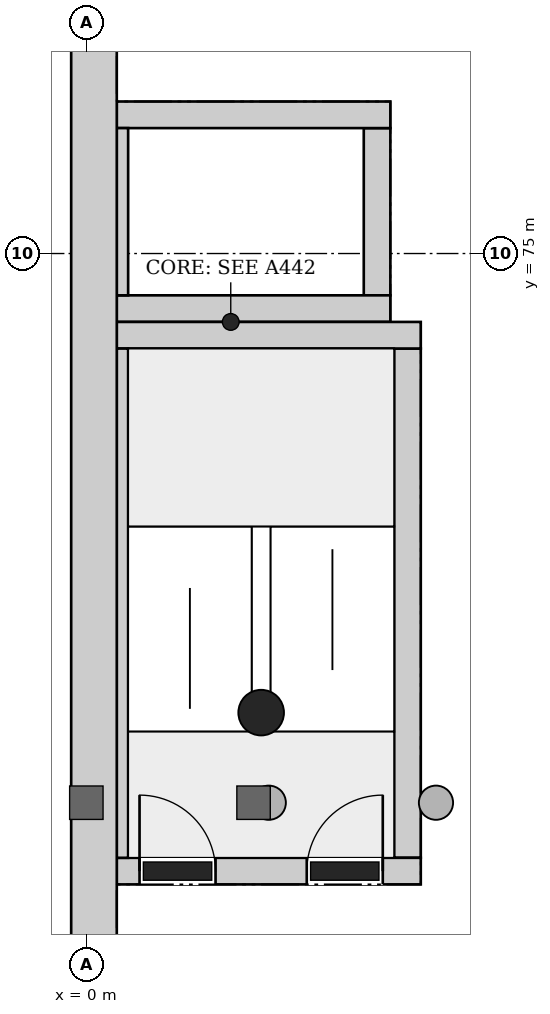
"""IFC4 building model, lengths in metres.
Left out: names, types, materials, properties, quantities, classifications, styles, units other than length and angle.
Written with IfcOpenShell. Run it as: python <this file> out.ifc"""

import sys

from ifc_helpers import new_model, si_unit, direction, frame, frame_2d, origin, place, context, subcontext, project, spatial, rectangle, extrude, element, fill, save


model = new_model("IFC4")
c1 = context("Model", 3, precision=1e-05, world=origin(), true_north=direction((0.0, 1.0)))
c2 = subcontext(c1, "Body", "Model", "MODEL_VIEW")
j1 = project(units=[si_unit("LENGTHUNIT", "METRE"), si_unit("PLANEANGLEUNIT", "RADIAN")], contexts=[c1])
p1 = place(None, origin())
s1 = spatial("IfcSite", under=j1, at=p1, CompositionType="ELEMENT")
p2 = place(p1, origin())
s2 = spatial("IfcBuilding", under=s1, at=p2, CompositionType="ELEMENT")
p3 = place(p2, frame((0.0, 0.0, -5.5)))
s3 = spatial("IfcBuildingStorey", under=s2, at=p3, CompositionType="ELEMENT", Elevation=-5.5)
p4 = place(p3, frame((0.101, 46.72, 0.0), z_axis=(0.0, 0.0, 1.0), x_axis=(0.0, 1.0, 0.0)))
e1 = element("IfcWall", 1, at=p4, inside=s3, PredefinedType="SOLIDWALL", context=c2, shape_type="SweptSolid", body=[
    extrude(rectangle(XDim=47.36, YDim=0.6, at=frame_2d((23.68, 0.0))), origin(), (0.0, 0.0, 1.0), 5.5),
])
p5 = place(p3, frame((0.4, 66.875, 0.0), z_axis=(0.0, 0.0, 1.0), x_axis=(1.0, 0.0, 0.0)))
e2 = element("IfcWall", 2, at=p5, inside=s3, PredefinedType="SHEAR", context=c2, shape_type="SweptSolid", body=[
    extrude(rectangle(XDim=4.0, YDim=0.35, at=frame_2d((2.0, 0.0))), origin(), (0.0, 0.0, 1.0), 5.5),
])
p6 = place(p5, frame((0.3, 0.0, 0.0)))
e3 = element("IfcOpeningElement", 3, at=p6, cuts=e2, PredefinedType="OPENING", context=c2, shape_type="SweptSolid", body=[
    extrude(rectangle(XDim=1.0, YDim=2.1, at=frame_2d((0.5, 1.05))), frame((0.0, 0.185, 0.0), z_axis=(0.0, -1.0, 0.0), x_axis=(1.0, 0.0, 0.0)), (0.0, 0.0, 1.0), 0.37),
])
p7 = place(p5, frame((2.5, 0.0, 0.0)))
e4 = element("IfcOpeningElement", 4, at=p7, cuts=e2, PredefinedType="OPENING", context=c2, shape_type="SweptSolid", body=[
    extrude(rectangle(XDim=1.0, YDim=2.1, at=frame_2d((0.5, 1.05))), frame((0.0, 0.185, 0.0), z_axis=(0.0, -1.0, 0.0), x_axis=(1.0, 0.0, 0.0)), (0.0, 0.0, 1.0), 0.37),
])
p8 = place(p3, frame((0.4, 73.925, 0.0), z_axis=(0.0, 0.0, 1.0), x_axis=(1.0, 0.0, 0.0)))
e5 = element("IfcWall", 5, at=p8, inside=s3, PredefinedType="SHEAR", context=c2, shape_type="SweptSolid", body=[
    extrude(rectangle(XDim=4.0, YDim=0.35, at=frame_2d((2.0, 0.0))), origin(), (0.0, 0.0, 1.0), 5.5),
])
p9 = place(p3, frame((0.475, 67.05, 0.0), z_axis=(0.0, 0.0, 1.0), x_axis=(0.0, 1.0, 0.0)))
e6 = element("IfcWall", 6, at=p9, inside=s3, PredefinedType="SHEAR", context=c2, shape_type="SweptSolid", body=[
    extrude(rectangle(XDim=6.7, YDim=0.15, at=frame_2d((3.35, 0.0))), origin(), (0.0, 0.0, 1.0), 5.5),
])
p10 = place(p3, frame((4.225, 67.05, 0.0), z_axis=(0.0, 0.0, 1.0), x_axis=(0.0, 1.0, 0.0)))
e7 = element("IfcWall", 7, at=p10, inside=s3, PredefinedType="SHEAR", context=c2, shape_type="SweptSolid", body=[
    extrude(rectangle(XDim=6.7, YDim=0.35, at=frame_2d((3.35, 0.0))), origin(), (0.0, 0.0, 1.0), 5.5),
])
for number, where, z_axis, x_axis in (
    (8, (0.4, 74.275, 0.0), (0.0, 0.0, 1.0), (1.0, 0.0, 0.0)),
    (9, (0.4, 76.825, 0.0), (0.0, 0.0, 1.0), (1.0, 0.0, 0.0)),
):
    element("IfcWall", number, at=place(p3, frame(where, z_axis=z_axis, x_axis=x_axis)), inside=s3, PredefinedType="SHEAR", context=c2, shape_type="SweptSolid", body=[
        extrude(rectangle(XDim=3.6, YDim=0.35, at=frame_2d((1.8, 0.0))), origin(), (0.0, 0.0, 1.0), 5.5),
    ])
p11 = place(p3, frame((0.475, 74.45, 0.0), z_axis=(0.0, 0.0, 1.0), x_axis=(0.0, 1.0, 0.0)))
e10 = element("IfcWall", 10, at=p11, inside=s3, PredefinedType="SHEAR", context=c2, shape_type="SweptSolid", body=[
    extrude(rectangle(XDim=2.2, YDim=0.15, at=frame_2d((1.1, 0.0))), origin(), (0.0, 0.0, 1.0), 5.5),
])
p12 = place(p3, frame((3.825, 74.45, 0.0), z_axis=(0.0, 0.0, 1.0), x_axis=(0.0, 1.0, 0.0)))
e11 = element("IfcWall", 11, at=p12, inside=s3, PredefinedType="SHEAR", context=c2, shape_type="SweptSolid", body=[
    extrude(rectangle(XDim=2.2, YDim=0.35, at=frame_2d((1.1, 0.0))), origin(), (0.0, 0.0, 1.0), 5.5),
])
p13 = place(p6, origin())
e12 = element("IfcDoor", 12, at=p13, inside=s3, OperationType="SINGLE_SWING_RIGHT", PredefinedType="DOOR", context=c2, shape_type="SweptSolid", body=[
    extrude(rectangle(XDim=1.0, YDim=2.1, at=frame_2d((0.5, 1.05))), frame((0.0, 0.025, 0.0), z_axis=(0.0, -1.0, 0.0), x_axis=(1.0, 0.0, 0.0)), (0.0, 0.0, 1.0), 0.05),
])
fill(e3, e12)
p14 = place(p7, origin())
e13 = element("IfcDoor", 13, at=p14, inside=s3, OperationType="SINGLE_SWING_LEFT", PredefinedType="DOOR", context=c2, shape_type="SweptSolid", body=[
    extrude(rectangle(XDim=1.0, YDim=2.1, at=frame_2d((0.5, 1.05))), frame((0.0, 0.025, 0.0), z_axis=(0.0, -1.0, 0.0), x_axis=(1.0, 0.0, 0.0)), (0.0, 0.0, 1.0), 0.05),
])
fill(e4, e13)
save(model, sys.argv[1])
